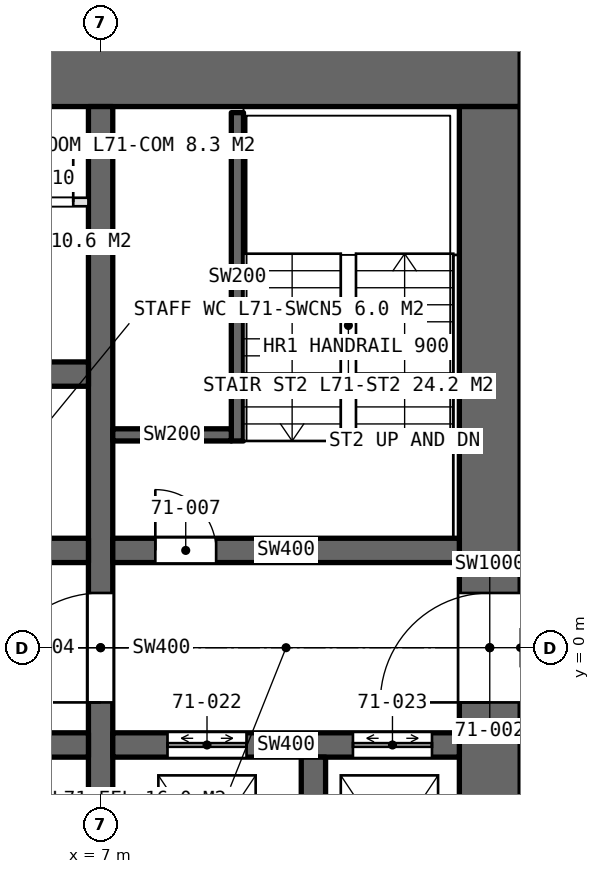
"""IFC4 building model, lengths in metres.
Left out: names, types, materials, properties, quantities, classifications, styles, units other than length and angle.
Written with IfcOpenShell. Run it as: python <this file> out.ifc"""

import sys

from ifc_helpers import new_model, si_unit, direction, frame, frame_2d, origin, place, context, subcontext, project, spatial, rectangle, extrude, element, fill, save


model = new_model("IFC4")
c1 = context("Model", 3, precision=1e-05, world=origin(), true_north=direction((0.0, 1.0)))
c2 = subcontext(c1, "Body", "Model", "MODEL_VIEW")
j1 = project(units=[si_unit("LENGTHUNIT", "METRE"), si_unit("PLANEANGLEUNIT", "RADIAN")], contexts=[c1])
p1 = place(None, origin())
s1 = spatial("IfcSite", under=j1, at=p1, CompositionType="ELEMENT")
p2 = place(p1, origin())
s2 = spatial("IfcBuilding", under=s1, at=p2, CompositionType="ELEMENT")
p3 = place(p2, frame((0.0, 0.0, 317.4)))
s3 = spatial("IfcBuildingStorey", under=s2, at=p3, CompositionType="ELEMENT", Elevation=317.4)
p4 = place(p3, frame((13.9, 9.4, 0.0), z_axis=(0.0, 0.0, 1.0), x_axis=(-1.0, 0.0, 0.0)))
e1 = element("IfcWall", 1, at=p4, inside=s3, PredefinedType="SHEAR", context=c2, shape_type="SweptSolid", body=[
    extrude(rectangle(XDim=27.8, YDim=1.0, at=frame_2d((13.9, 0.0))), origin(), (0.0, 0.0, 1.0), 4.2),
])
p5 = place(p4, frame((23.9, 0.0, 0.0)))
e2 = element("IfcOpeningElement", 2, at=p5, cuts=e1, PredefinedType="OPENING", context=c2, shape_type="SweptSolid", body=[
    extrude(rectangle(XDim=1.0, YDim=2.4, at=frame_2d((0.5, 1.2))), frame((0.0, 0.51, 0.0), z_axis=(0.0, -1.0, 0.0), x_axis=(1.0, 0.0, 0.0)), (0.0, 0.0, 1.0), 1.02),
])
p6 = place(p4, frame((13.0, 0.0, 0.0)))
e3 = element("IfcOpeningElement", 3, at=p6, cuts=e1, PredefinedType="OPENING", context=c2, shape_type="SweptSolid", body=[
    extrude(rectangle(XDim=1.8, YDim=2.4, at=frame_2d((0.9, 1.2))), frame((0.0, 0.51, 0.0), z_axis=(0.0, -1.0, 0.0), x_axis=(1.0, 0.0, 0.0)), (0.0, 0.0, 1.0), 1.02),
])
p7 = place(p3, frame((13.4, -8.9, 0.0), z_axis=(0.0, 0.0, 1.0), x_axis=(0.0, 1.0, 0.0)))
e4 = element("IfcWall", 4, at=p7, inside=s3, PredefinedType="SHEAR", context=c2, shape_type="SweptSolid", body=[
    extrude(rectangle(XDim=17.8, YDim=1.0, at=frame_2d((8.9, 0.0))), origin(), (0.0, 0.0, 1.0), 4.2),
])
p8 = place(p7, frame((8.0, 0.0, 0.0)))
e5 = element("IfcOpeningElement", 5, at=p8, cuts=e4, PredefinedType="OPENING", context=c2, shape_type="SweptSolid", body=[
    extrude(rectangle(XDim=1.8, YDim=2.4, at=frame_2d((0.9, 1.2))), frame((0.0, 0.51, 0.0), z_axis=(0.0, -1.0, 0.0), x_axis=(1.0, 0.0, 0.0)), (0.0, 0.0, 1.0), 1.02),
])
p9 = place(p3, frame((7.0, -8.9, 0.0), z_axis=(0.0, 0.0, 1.0), x_axis=(0.0, 1.0, 0.0)))
e6 = element("IfcWall", 6, at=p9, inside=s3, PredefinedType="SHEAR", context=c2, shape_type="SweptSolid", body=[
    extrude(rectangle(XDim=17.8, YDim=0.4, at=frame_2d((8.9, 0.0))), origin(), (0.0, 0.0, 1.0), 4.2),
])
p10 = place(p9, frame((8.0, 0.0, 0.0)))
e7 = element("IfcOpeningElement", 7, at=p10, cuts=e6, PredefinedType="OPENING", context=c2, shape_type="SweptSolid", body=[
    extrude(rectangle(XDim=1.8, YDim=2.4, at=frame_2d((0.9, 1.2))), frame((0.0, 0.21, 0.0), z_axis=(0.0, -1.0, 0.0), x_axis=(1.0, 0.0, 0.0)), (0.0, 0.0, 1.0), 0.42),
])
p11 = place(p3, frame((-6.8, 1.6, 0.0), z_axis=(0.0, 0.0, 1.0), x_axis=(1.0, 0.0, 0.0)))
e8 = element("IfcWall", 8, at=p11, inside=s3, PredefinedType="SHEAR", context=c2, shape_type="SweptSolid", body=[
    extrude(rectangle(XDim=13.6, YDim=0.4, at=frame_2d((6.8, 0.0))), origin(), (0.0, 0.0, 1.0), 4.2),
])
p12 = place(p11, frame((1.365, 0.0, 0.0)))
e9 = element("IfcOpeningElement", 9, at=p12, cuts=e8, PredefinedType="OPENING", context=c2, shape_type="SweptSolid", body=[
    extrude(rectangle(XDim=1.0, YDim=2.4, at=frame_2d((0.5, 1.2))), frame((0.0, 0.21, 0.0), z_axis=(0.0, -1.0, 0.0), x_axis=(1.0, 0.0, 0.0)), (0.0, 0.0, 1.0), 0.42),
])
p13 = place(p11, frame((5.1, 0.0, 0.0)))
e10 = element("IfcOpeningElement", 10, at=p13, cuts=e8, PredefinedType="OPENING", context=c2, shape_type="SweptSolid", body=[
    extrude(rectangle(XDim=1.0, YDim=2.4, at=frame_2d((0.5, 1.2))), frame((0.0, 0.21, 0.0), z_axis=(0.0, -1.0, 0.0), x_axis=(1.0, 0.0, 0.0)), (0.0, 0.0, 1.0), 0.42),
])
p14 = place(p11, frame((8.635, 0.0, 0.0)))
e11 = element("IfcOpeningElement", 11, at=p14, cuts=e8, PredefinedType="OPENING", context=c2, shape_type="SweptSolid", body=[
    extrude(rectangle(XDim=1.0, YDim=2.4, at=frame_2d((0.5, 1.2))), frame((0.0, 0.21, 0.0), z_axis=(0.0, -1.0, 0.0), x_axis=(1.0, 0.0, 0.0)), (0.0, 0.0, 1.0), 0.42),
])
p15 = place(p11, frame((11.9, 0.0, 0.0)))
e12 = element("IfcOpeningElement", 12, at=p15, cuts=e8, PredefinedType="OPENING", context=c2, shape_type="SweptSolid", body=[
    extrude(rectangle(XDim=1.0, YDim=2.4, at=frame_2d((0.5, 1.2))), frame((0.0, 0.21, 0.0), z_axis=(0.0, -1.0, 0.0), x_axis=(1.0, 0.0, 0.0)), (0.0, 0.0, 1.0), 0.42),
])
p16 = place(p3, frame((-6.8, -1.6, 0.0), z_axis=(0.0, 0.0, 1.0), x_axis=(1.0, 0.0, 0.0)))
e13 = element("IfcWall", 13, at=p16, inside=s3, PredefinedType="SHEAR", context=c2, shape_type="SweptSolid", body=[
    extrude(rectangle(XDim=13.6, YDim=0.4, at=frame_2d((6.8, 0.0))), origin(), (0.0, 0.0, 1.0), 4.2),
])
p17 = place(p16, frame((11.9, 0.0, 0.0)))
e14 = element("IfcOpeningElement", 14, at=p17, cuts=e13, PredefinedType="OPENING", context=c2, shape_type="SweptSolid", body=[
    extrude(rectangle(XDim=1.0, YDim=2.4, at=frame_2d((0.5, 1.2))), frame((0.0, 0.21, 0.0), z_axis=(0.0, -1.0, 0.0), x_axis=(1.0, 0.0, 0.0)), (0.0, 0.0, 1.0), 0.42),
])
p18 = place(p16, frame((4.5, 0.0, 0.0)))
e15 = element("IfcOpeningElement", 15, at=p18, cuts=e13, PredefinedType="OPENING", context=c2, shape_type="SweptSolid", body=[
    extrude(rectangle(XDim=1.8, YDim=2.4, at=frame_2d((0.9, 1.2))), frame((0.0, 0.21, 0.0), z_axis=(0.0, -1.0, 0.0), x_axis=(1.0, 0.0, 0.0)), (0.0, 0.0, 1.0), 0.42),
])
p19 = place(p3, frame((-6.8, 4.5, 0.0), z_axis=(0.0, 0.0, 1.0), x_axis=(1.0, 0.0, 0.0)))
e16 = element("IfcWall", 16, at=p19, inside=s3, PredefinedType="SHEAR", context=c2, shape_type="SweptSolid", body=[
    extrude(rectangle(XDim=13.6, YDim=0.4, at=frame_2d((6.8, 0.0))), origin(), (0.0, 0.0, 1.0), 4.2),
])
p20 = place(p3, frame((7.2, 1.6, 0.0), z_axis=(0.0, 0.0, 1.0), x_axis=(1.0, 0.0, 0.0)))
e17 = element("IfcWall", 17, at=p20, inside=s3, PredefinedType="SHEAR", context=c2, shape_type="SweptSolid", body=[
    extrude(rectangle(XDim=5.7, YDim=0.4, at=frame_2d((2.85, 0.0))), origin(), (0.0, 0.0, 1.0), 4.2),
])
p21 = place(p20, frame((0.7, 0.0, 0.0)))
e18 = element("IfcOpeningElement", 18, at=p21, cuts=e17, PredefinedType="OPENING", context=c2, shape_type="SweptSolid", body=[
    extrude(rectangle(XDim=1.0, YDim=2.4, at=frame_2d((0.5, 1.2))), frame((0.0, 0.21, 0.0), z_axis=(0.0, -1.0, 0.0), x_axis=(1.0, 0.0, 0.0)), (0.0, 0.0, 1.0), 0.42),
])
p22 = place(p3, frame((7.2, -1.6, 0.0), z_axis=(0.0, 0.0, 1.0), x_axis=(1.0, 0.0, 0.0)))
e19 = element("IfcWall", 19, at=p22, inside=s3, PredefinedType="SHEAR", context=c2, shape_type="SweptSolid", body=[
    extrude(rectangle(XDim=5.7, YDim=0.4, at=frame_2d((2.85, 0.0))), origin(), (0.0, 0.0, 1.0), 4.2),
])
p23 = place(p22, frame((0.9, 0.0, 0.0)))
e20 = element("IfcOpeningElement", 20, at=p23, cuts=e19, PredefinedType="OPENING", context=c2, shape_type="SweptSolid", body=[
    extrude(rectangle(XDim=1.3, YDim=2.4, at=frame_2d((0.65, 1.2))), frame((0.0, 0.21, 0.0), z_axis=(0.0, -1.0, 0.0), x_axis=(1.0, 0.0, 0.0)), (0.0, 0.0, 1.0), 0.42),
])
p24 = place(p22, frame((3.95, 0.0, 0.0)))
e21 = element("IfcOpeningElement", 21, at=p24, cuts=e19, PredefinedType="OPENING", context=c2, shape_type="SweptSolid", body=[
    extrude(rectangle(XDim=1.3, YDim=2.4, at=frame_2d((0.65, 1.2))), frame((0.0, 0.21, 0.0), z_axis=(0.0, -1.0, 0.0), x_axis=(1.0, 0.0, 0.0)), (0.0, 0.0, 1.0), 0.42),
])
p25 = place(p3, frame((10.5, -4.8, 0.0), z_axis=(0.0, 0.0, 1.0), x_axis=(0.0, 1.0, 0.0)))
e22 = element("IfcWall", 22, at=p25, inside=s3, PredefinedType="SHEAR", context=c2, shape_type="SweptSolid", body=[
    extrude(rectangle(XDim=3.0, YDim=0.4, at=frame_2d((1.5, 0.0))), origin(), (0.0, 0.0, 1.0), 4.2),
])
p26 = place(p3, frame((-6.8, 7.33, 0.0), z_axis=(0.0, 0.0, 1.0), x_axis=(1.0, 0.0, 0.0)))
e23 = element("IfcWall", 23, at=p26, inside=s3, PredefinedType="PARTITIONING", context=c2, shape_type="SweptSolid", body=[
    extrude(rectangle(XDim=13.6, YDim=0.14, at=frame_2d((6.8, 0.0))), origin(), (0.0, 0.0, 1.0), 3.95),
])
p27 = place(p26, frame((3.28, 0.0, 0.0)))
e24 = element("IfcOpeningElement", 24, at=p27, cuts=e23, PredefinedType="OPENING", context=c2, shape_type="SweptSolid", body=[
    extrude(rectangle(XDim=1.0, YDim=2.4, at=frame_2d((0.5, 1.2))), frame((0.0, 0.08, 0.0), z_axis=(0.0, -1.0, 0.0), x_axis=(1.0, 0.0, 0.0)), (0.0, 0.0, 1.0), 0.16),
])
p28 = place(p26, frame((8.08, 0.0, 0.0)))
e25 = element("IfcOpeningElement", 25, at=p28, cuts=e23, PredefinedType="OPENING", context=c2, shape_type="SweptSolid", body=[
    extrude(rectangle(XDim=1.0, YDim=2.4, at=frame_2d((0.5, 1.2))), frame((0.0, 0.08, 0.0), z_axis=(0.0, -1.0, 0.0), x_axis=(1.0, 0.0, 0.0)), (0.0, 0.0, 1.0), 0.16),
])
p29 = place(p26, frame((12.25, 0.0, 0.0)))
e26 = element("IfcOpeningElement", 26, at=p29, cuts=e23, PredefinedType="OPENING", context=c2, shape_type="SweptSolid", body=[
    extrude(rectangle(XDim=1.1, YDim=2.4, at=frame_2d((0.55, 1.2))), frame((0.0, 0.08, 0.0), z_axis=(0.0, -1.0, 0.0), x_axis=(1.0, 0.0, 0.0)), (0.0, 0.0, 1.0), 0.16),
])
p30 = place(p3, frame((9.25, 3.4, 0.0), z_axis=(0.0, 0.0, 1.0), x_axis=(0.0, 1.0, 0.0)))
e27 = element("IfcWall", 27, at=p30, inside=s3, PredefinedType="SOLIDWALL", context=c2, shape_type="SweptSolid", body=[
    extrude(rectangle(XDim=5.4, YDim=0.2, at=frame_2d((2.7, 0.0))), origin(), (0.0, 0.0, 1.0), 4.2),
])
p31 = place(p3, frame((9.15, 3.5, 0.0), z_axis=(0.0, 0.0, 1.0), x_axis=(-1.0, 0.0, 0.0)))
e28 = element("IfcWall", 28, at=p31, inside=s3, PredefinedType="SOLIDWALL", context=c2, shape_type="SweptSolid", body=[
    extrude(rectangle(XDim=1.95, YDim=0.2, at=frame_2d((0.975, 0.0))), origin(), (0.0, 0.0, 1.0), 4.2),
])
p32 = place(p8, origin())
e29 = element("IfcDoor", 29, at=p32, inside=s3, OperationType="DOUBLE_DOOR_SINGLE_SWING", PredefinedType="DOOR", context=c2, shape_type="SweptSolid", body=[
    extrude(rectangle(XDim=1.8, YDim=2.4, at=frame_2d((0.9, 1.2))), frame((0.0, 0.025, 0.0), z_axis=(0.0, -1.0, 0.0), x_axis=(1.0, 0.0, 0.0)), (0.0, 0.0, 1.0), 0.05),
])
fill(e5, e29)
p33 = place(p10, origin())
e30 = element("IfcDoor", 30, at=p33, inside=s3, OperationType="DOUBLE_DOOR_SINGLE_SWING", PredefinedType="DOOR", context=c2, shape_type="SweptSolid", body=[
    extrude(rectangle(XDim=1.8, YDim=2.4, at=frame_2d((0.9, 1.2))), frame((0.0, 0.025, 0.0), z_axis=(0.0, -1.0, 0.0), x_axis=(1.0, 0.0, 0.0)), (0.0, 0.0, 1.0), 0.05),
])
fill(e7, e30)
p34 = place(p21, origin())
e31 = element("IfcDoor", 31, at=p34, inside=s3, OperationType="SINGLE_SWING_LEFT", PredefinedType="DOOR", context=c2, shape_type="SweptSolid", body=[
    extrude(rectangle(XDim=1.0, YDim=2.4, at=frame_2d((0.5, 1.2))), frame((0.0, 0.025, 0.0), z_axis=(0.0, -1.0, 0.0), x_axis=(1.0, 0.0, 0.0)), (0.0, 0.0, 1.0), 0.05),
])
fill(e18, e31)
p35 = place(p29, origin())
e32 = element("IfcDoor", 32, at=p35, inside=s3, OperationType="SINGLE_SWING_RIGHT", PredefinedType="DOOR", context=c2, shape_type="SweptSolid", body=[
    extrude(rectangle(XDim=1.1, YDim=2.4, at=frame_2d((0.55, 1.2))), frame((0.0, 0.025, 0.0), z_axis=(0.0, -1.0, 0.0), x_axis=(1.0, 0.0, 0.0)), (0.0, 0.0, 1.0), 0.05),
])
fill(e26, e32)
p36 = place(p23, origin())
e33 = element("IfcDoor", 33, at=p36, inside=s3, OperationType="DOUBLE_DOOR_SLIDING", PredefinedType="DOOR", context=c2, shape_type="SweptSolid", body=[
    extrude(rectangle(XDim=1.3, YDim=2.4, at=frame_2d((0.65, 1.2))), frame((0.0, 0.025, 0.0), z_axis=(0.0, -1.0, 0.0), x_axis=(1.0, 0.0, 0.0)), (0.0, 0.0, 1.0), 0.05),
])
fill(e20, e33)
p37 = place(p24, origin())
e34 = element("IfcDoor", 34, at=p37, inside=s3, OperationType="DOUBLE_DOOR_SLIDING", PredefinedType="DOOR", context=c2, shape_type="SweptSolid", body=[
    extrude(rectangle(XDim=1.3, YDim=2.4, at=frame_2d((0.65, 1.2))), frame((0.0, 0.025, 0.0), z_axis=(0.0, -1.0, 0.0), x_axis=(1.0, 0.0, 0.0)), (0.0, 0.0, 1.0), 0.05),
])
fill(e21, e34)
save(model, sys.argv[1])
